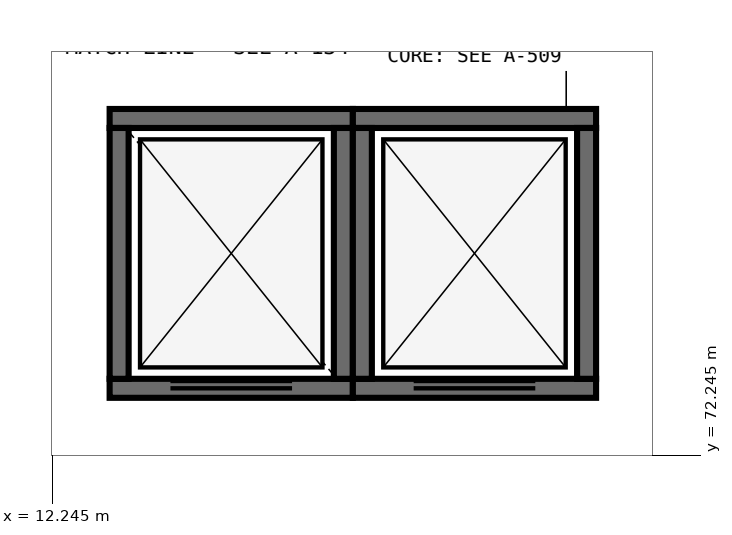
"""IFC4 building model, lengths in metres.
Left out: names, types, materials, properties, quantities, classifications, styles, units other than length and angle.
Written with IfcOpenShell. Run it as: python <this file> out.ifc"""

import sys

from ifc_helpers import new_model, si_unit, direction, frame, frame_2d, origin, place, context, subcontext, project, spatial, rectangle, extrude, element, fill, save


model = new_model("IFC4")
c1 = context("Model", 3, precision=1e-05, world=origin(), true_north=direction((0.0, 1.0)))
c2 = subcontext(c1, "Body", "Model", "MODEL_VIEW")
j1 = project(units=[si_unit("LENGTHUNIT", "METRE"), si_unit("PLANEANGLEUNIT", "RADIAN")], contexts=[c1])
p1 = place(None, origin())
s1 = spatial("IfcSite", under=j1, at=p1, CompositionType="ELEMENT")
p2 = place(p1, origin())
s2 = spatial("IfcBuilding", under=s1, at=p2, CompositionType="ELEMENT")
p3 = place(p2, frame((0.0, 0.0, 12.0)))
s3 = spatial("IfcBuildingStorey", under=s2, at=p3, CompositionType="ELEMENT", Elevation=12.0)
p4 = place(p3, frame((13.0, 73.125, 0.0), z_axis=(0.0, 0.0, 1.0), x_axis=(1.0, 0.0, 0.0)))
e1 = element("IfcWall", 1, at=p4, inside=s3, PredefinedType="SHEAR", context=c2, shape_type="SweptSolid", body=[
    extrude(rectangle(XDim=3.2, YDim=0.25, at=frame_2d((1.6, 0.0))), origin(), (0.0, 0.0, 1.0), 6.0),
])
p5 = place(p4, frame((0.8, 0.0, 0.0)))
e2 = element("IfcOpeningElement", 2, at=p5, cuts=e1, PredefinedType="OPENING", context=c2, shape_type="SweptSolid", body=[
    extrude(rectangle(XDim=1.6, YDim=2.4, at=frame_2d((0.8, 1.2))), frame((0.0, 0.14, 0.0), z_axis=(0.0, -1.0, 0.0), x_axis=(1.0, 0.0, 0.0)), (0.0, 0.0, 1.0), 0.28),
])
p6 = place(p3, frame((16.2, 76.675, 0.0), z_axis=(0.0, 0.0, 1.0), x_axis=(-1.0, 0.0, 0.0)))
e3 = element("IfcWall", 3, at=p6, inside=s3, PredefinedType="SHEAR", context=c2, shape_type="SweptSolid", body=[
    extrude(rectangle(XDim=3.2, YDim=0.25, at=frame_2d((1.6, 0.0))), origin(), (0.0, 0.0, 1.0), 6.0),
])
for number, where, z_axis, x_axis in (
    (4, (13.125, 76.55, 0.0), (0.0, 0.0, 1.0), (0.0, -1.0, 0.0)),
    (5, (16.075, 73.25, 0.0), (0.0, 0.0, 1.0), (0.0, 1.0, 0.0)),
):
    element("IfcWall", number, at=place(p3, frame(where, z_axis=z_axis, x_axis=x_axis)), inside=s3, PredefinedType="SHEAR", context=c2, shape_type="SweptSolid", body=[
        extrude(rectangle(XDim=3.3, YDim=0.25, at=frame_2d((1.65, 0.0))), origin(), (0.0, 0.0, 1.0), 6.0),
    ])
p7 = place(p3, frame((16.2, 73.125, 0.0), z_axis=(0.0, 0.0, 1.0), x_axis=(1.0, 0.0, 0.0)))
e6 = element("IfcWall", 6, at=p7, inside=s3, PredefinedType="SHEAR", context=c2, shape_type="SweptSolid", body=[
    extrude(rectangle(XDim=3.2, YDim=0.25, at=frame_2d((1.6, 0.0))), origin(), (0.0, 0.0, 1.0), 6.0),
])
p8 = place(p7, frame((0.8, 0.0, 0.0)))
e7 = element("IfcOpeningElement", 7, at=p8, cuts=e6, PredefinedType="OPENING", context=c2, shape_type="SweptSolid", body=[
    extrude(rectangle(XDim=1.6, YDim=2.4, at=frame_2d((0.8, 1.2))), frame((0.0, 0.14, 0.0), z_axis=(0.0, -1.0, 0.0), x_axis=(1.0, 0.0, 0.0)), (0.0, 0.0, 1.0), 0.28),
])
p9 = place(p3, frame((19.4, 76.675, 0.0), z_axis=(0.0, 0.0, 1.0), x_axis=(-1.0, 0.0, 0.0)))
e8 = element("IfcWall", 8, at=p9, inside=s3, PredefinedType="SHEAR", context=c2, shape_type="SweptSolid", body=[
    extrude(rectangle(XDim=3.2, YDim=0.25, at=frame_2d((1.6, 0.0))), origin(), (0.0, 0.0, 1.0), 6.0),
])
for number, where, z_axis, x_axis in (
    (9, (16.325, 76.55, 0.0), (0.0, 0.0, 1.0), (0.0, -1.0, 0.0)),
    (10, (19.275, 73.25, 0.0), (0.0, 0.0, 1.0), (0.0, 1.0, 0.0)),
):
    element("IfcWall", number, at=place(p3, frame(where, z_axis=z_axis, x_axis=x_axis)), inside=s3, PredefinedType="SHEAR", context=c2, shape_type="SweptSolid", body=[
        extrude(rectangle(XDim=3.3, YDim=0.25, at=frame_2d((1.65, 0.0))), origin(), (0.0, 0.0, 1.0), 6.0),
    ])
p10 = place(p5, origin())
e11 = element("IfcDoor", 11, at=p10, inside=s3, OperationType="DOUBLE_DOOR_SLIDING", PredefinedType="DOOR", context=c2, shape_type="SweptSolid", body=[
    extrude(rectangle(XDim=1.6, YDim=2.4, at=frame_2d((0.8, 1.2))), frame((0.0, 0.025, 0.0), z_axis=(0.0, -1.0, 0.0), x_axis=(1.0, 0.0, 0.0)), (0.0, 0.0, 1.0), 0.05),
])
fill(e2, e11)
p11 = place(p8, origin())
e12 = element("IfcDoor", 12, at=p11, inside=s3, OperationType="DOUBLE_DOOR_SLIDING", PredefinedType="DOOR", context=c2, shape_type="SweptSolid", body=[
    extrude(rectangle(XDim=1.6, YDim=2.4, at=frame_2d((0.8, 1.2))), frame((0.0, 0.025, 0.0), z_axis=(0.0, -1.0, 0.0), x_axis=(1.0, 0.0, 0.0)), (0.0, 0.0, 1.0), 0.05),
])
fill(e7, e12)
save(model, sys.argv[1])
